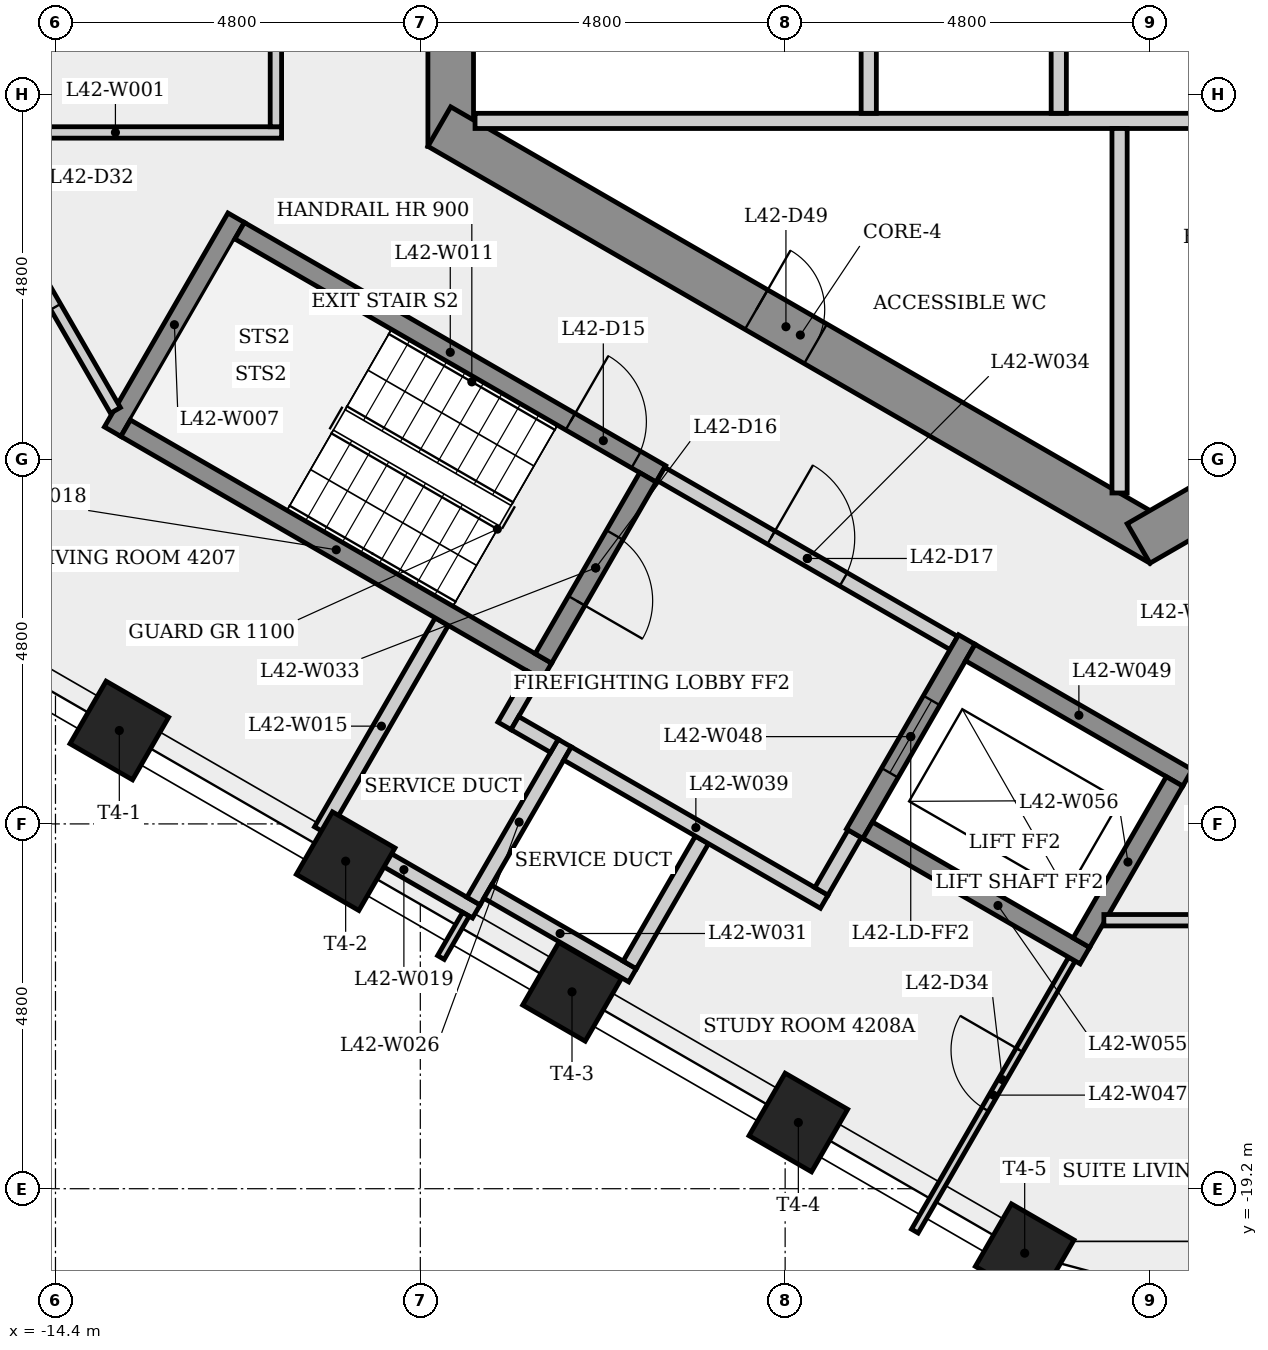
"""IFC4 building model, lengths in metres.
Left out: names, types, materials, properties, quantities, classifications, styles, units other than length and angle.
Written with IfcOpenShell. Run it as: python <this file> out.ifc"""

import sys

from ifc_helpers import new_model, si_unit, direction, frame, frame_2d, origin, origin_2d, place, context, subcontext, project, spatial, rectangle, extrude, element, fill, save


model = new_model("IFC4")
c1 = context("Model", 3, precision=1e-05, world=origin(), true_north=direction((0.0, 1.0)))
c2 = subcontext(c1, "Body", "Model", "MODEL_VIEW")
j1 = project(units=[si_unit("LENGTHUNIT", "METRE"), si_unit("PLANEANGLEUNIT", "RADIAN")], contexts=[c1])
p1 = place(None, origin())
s1 = spatial("IfcSite", under=j1, at=p1, CompositionType="ELEMENT")
p2 = place(p1, origin())
s2 = spatial("IfcBuilding", under=s1, at=p2, CompositionType="ELEMENT")
p3 = place(p2, frame((0.0, 0.0, 159.5)))
s3 = spatial("IfcBuildingStorey", under=s2, at=p3, CompositionType="ELEMENT", Elevation=159.5)
p4 = place(p3, frame((-9.2, 5.485, 0.0), z_axis=(0.0, 0.0, 1.0), x_axis=(0.0, -1.0, 0.0)))
e1 = element("IfcWall", 1, at=p4, inside=s3, PredefinedType="SHEAR", context=c2, shape_type="SweptSolid", body=[
    extrude(rectangle(XDim=10.97, YDim=0.6, at=frame_2d((5.485, 0.0))), origin(), (0.0, 0.0, 1.0), 3.4),
])
p5 = place(p4, frame((8.516, 0.0, 0.0)))
e2 = element("IfcOpeningElement", 2, at=p5, cuts=e1, PredefinedType="OPENING", context=c2, shape_type="SweptSolid", body=[
    extrude(rectangle(XDim=0.9, YDim=2.1, at=frame_2d((0.45, 1.05))), frame((0.0, 0.31, 0.0), z_axis=(0.0, -1.0, 0.0), x_axis=(1.0, 0.0, 0.0)), (0.0, 0.0, 1.0), 0.62),
])
p6 = place(p4, frame((4.685, 0.0, 0.0)))
e3 = element("IfcOpeningElement", 3, at=p6, cuts=e1, PredefinedType="OPENING", context=c2, shape_type="SweptSolid", body=[
    extrude(rectangle(XDim=1.6, YDim=2.1, at=frame_2d((0.8, 1.05))), frame((0.0, 0.31, 0.0), z_axis=(0.0, -1.0, 0.0), x_axis=(1.0, 0.0, 0.0)), (0.0, 0.0, 1.0), 0.62),
])
p7 = place(p3, frame((-9.35, -5.225, 0.0), z_axis=(0.0, 0.0, 1.0), x_axis=(0.866023993627, -0.500002442456, 0.0)))
e4 = element("IfcWall", 4, at=p7, inside=s3, PredefinedType="SHEAR", context=c2, shape_type="SweptSolid", body=[
    extrude(rectangle(XDim=10.97, YDim=0.6, at=frame_2d((5.485, 0.0))), origin(), (0.0, 0.0, 1.0), 3.4),
])
p8 = place(p7, frame((4.816, 0.0, 0.0)))
e5 = element("IfcOpeningElement", 5, at=p8, cuts=e4, PredefinedType="OPENING", context=c2, shape_type="SweptSolid", body=[
    extrude(rectangle(XDim=0.9, YDim=2.1, at=frame_2d((0.45, 1.05))), frame((0.0, 0.31, 0.0), z_axis=(0.0, -1.0, 0.0), x_axis=(1.0, 0.0, 0.0)), (0.0, 0.0, 1.0), 0.62),
])
p9 = place(p3, frame((-0.15, -10.71, 0.0), z_axis=(0.0, 0.0, 1.0), x_axis=(0.866023993627, 0.500002442456, 0.0)))
e6 = element("IfcWall", 6, at=p9, inside=s3, PredefinedType="SHEAR", context=c2, shape_type="SweptSolid", body=[
    extrude(rectangle(XDim=10.97, YDim=0.6, at=frame_2d((5.485, 0.0))), origin(), (0.0, 0.0, 1.0), 3.4),
])
p10 = place(p9, frame((1.975, 0.0, 0.0)))
e7 = element("IfcOpeningElement", 7, at=p10, cuts=e6, PredefinedType="OPENING", context=c2, shape_type="SweptSolid", body=[
    extrude(rectangle(XDim=0.9, YDim=2.1, at=frame_2d((0.45, 1.05))), frame((0.0, 0.31, 0.0), z_axis=(0.0, -1.0, 0.0), x_axis=(1.0, 0.0, 0.0)), (0.0, 0.0, 1.0), 0.62),
])
p11 = place(p9, frame((8.782, 0.0, 0.0)))
e8 = element("IfcOpeningElement", 8, at=p11, cuts=e6, PredefinedType="OPENING", context=c2, shape_type="SweptSolid", body=[
    extrude(rectangle(XDim=0.9, YDim=2.1, at=frame_2d((0.45, 1.05))), frame((0.0, 0.31, 0.0), z_axis=(0.0, -1.0, 0.0), x_axis=(1.0, 0.0, 0.0)), (0.0, 0.0, 1.0), 0.62),
])
for number, where, z_axis, x_axis in (
    (9, (-13.56, -13.171, 0.0), (0.0, 0.0, 1.0), (-0.5, -0.866, 0.0)),
    (10, (-10.582, -14.89, 0.0), (0.0, 0.0, 1.0), (-0.5, -0.866, 0.0)),
    (11, (-7.604, -16.61, 0.0), (0.0, 0.0, 1.0), (-0.5, -0.866, 0.0)),
    (12, (-4.626, -18.329, 0.0), (0.0, 0.0, 1.0), (-0.5, -0.866, 0.0)),
    (13, (-1.648, -20.048, 0.0), (0.0, 0.0, 1.0), (-0.5, -0.866, 0.0)),
):
    element("IfcColumn", number, at=place(p3, frame(where, z_axis=z_axis, x_axis=x_axis)), inside=s3, PredefinedType="COLUMN", context=c2, shape_type="SweptSolid", body=[
        extrude(rectangle(XDim=0.95, YDim=0.95, at=origin_2d()), origin(), (0.0, 0.0, 1.0), 3.4),
    ])
p12 = place(p3, frame((-15.798, -5.302, 0.0), z_axis=(0.0, 0.0, 1.0), x_axis=(1.0, 0.0, 0.0)))
e14 = element("IfcWall", 14, at=p12, inside=s3, PredefinedType="PARTITIONING", context=c2, shape_type="SweptSolid", body=[
    extrude(rectangle(XDim=4.373, YDim=0.15, at=frame_2d((2.187, 0.0))), origin(), (0.0, 0.0, 1.0), 3.05),
])
p13 = place(p3, frame((-13.648, -9.239, 0.0), z_axis=(0.0, 0.0, 1.0), x_axis=(0.500017246033, 0.866015446554, 0.0)))
e15 = element("IfcWall", 15, at=p13, inside=s3, PredefinedType="SHEAR", context=c2, shape_type="SweptSolid", body=[
    extrude(rectangle(XDim=3.25, YDim=0.25, at=frame_2d((1.625, 0.0))), origin(), (0.0, 0.0, 1.0), 3.05),
])
p14 = place(p3, frame((-13.611, -8.959, 0.0), z_axis=(0.0, 0.0, 1.0), x_axis=(-0.499994179242, 0.866028764375, 0.0)))
e16 = element("IfcWall", 16, at=p14, inside=s3, PredefinedType="PARTITIONING", context=c2, shape_type="SweptSolid", body=[
    extrude(rectangle(XDim=4.148, YDim=0.15, at=frame_2d((2.074, 0.0))), origin(), (0.0, 0.0, 1.0), 3.05),
])
p15 = place(p14, frame((1.574, 0.0, 0.0)))
e17 = element("IfcOpeningElement", 17, at=p15, cuts=e16, PredefinedType="OPENING", context=c2, shape_type="SweptSolid", body=[
    extrude(rectangle(XDim=1.0, YDim=2.1, at=frame_2d((0.5, 1.05))), frame((0.0, 0.085, 0.0), z_axis=(0.0, -1.0, 0.0), x_axis=(1.0, 0.0, 0.0)), (0.0, 0.0, 1.0), 0.17),
])
p16 = place(p3, frame((-11.977, -6.595, 0.0), z_axis=(0.0, 0.0, 1.0), x_axis=(0.866025499775, -0.499999833739, 0.0)))
e18 = element("IfcWall", 18, at=p16, inside=s3, PredefinedType="SHEAR", context=c2, shape_type="SweptSolid", body=[
    extrude(rectangle(XDim=6.4, YDim=0.25, at=frame_2d((3.2, 0.0))), origin(), (0.0, 0.0, 1.0), 3.05),
])
p17 = place(p16, frame((5.025, 0.0, 0.0)))
e19 = element("IfcOpeningElement", 19, at=p17, cuts=e18, PredefinedType="OPENING", context=c2, shape_type="SweptSolid", body=[
    extrude(rectangle(XDim=1.0, YDim=2.1, at=frame_2d((0.5, 1.05))), frame((0.0, 0.135, 0.0), z_axis=(0.0, -1.0, 0.0), x_axis=(1.0, 0.0, 0.0)), (0.0, 0.0, 1.0), 0.27),
])
p18 = place(p3, frame((-11.5, -5.227, 0.0), z_axis=(0.0, 0.0, 1.0), x_axis=(0.0, 1.0, 0.0)))
e20 = element("IfcWall", 20, at=p18, inside=s3, PredefinedType="PARTITIONING", context=c2, shape_type="SweptSolid", body=[
    extrude(rectangle(XDim=10.604, YDim=0.15, at=frame_2d((5.302, 0.0))), origin(), (0.0, 0.0, 1.0), 3.05),
])
p19 = place(p18, frame((9.229, 0.0, 0.0)))
e21 = element("IfcOpeningElement", 21, at=p19, cuts=e20, PredefinedType="OPENING", context=c2, shape_type="SweptSolid", body=[
    extrude(rectangle(XDim=0.9, YDim=2.1, at=frame_2d((0.45, 1.05))), frame((0.0, 0.085, 0.0), z_axis=(0.0, -1.0, 0.0), x_axis=(1.0, 0.0, 0.0)), (0.0, 0.0, 1.0), 0.17),
])
p20 = place(p18, frame((2.982, 0.0, 0.0)))
e22 = element("IfcOpeningElement", 22, at=p20, cuts=e20, PredefinedType="OPENING", context=c2, shape_type="SweptSolid", body=[
    extrude(rectangle(XDim=1.0, YDim=2.1, at=frame_2d((0.5, 1.05))), frame((0.0, 0.085, 0.0), z_axis=(0.0, -1.0, 0.0), x_axis=(1.0, 0.0, 0.0)), (0.0, 0.0, 1.0), 0.17),
])
p21 = place(p3, frame((-10.905, -14.489, 0.0), z_axis=(0.0, 0.0, 1.0), x_axis=(0.499959856469, 0.866048579423, 0.0)))
e23 = element("IfcWall", 23, at=p21, inside=s3, PredefinedType="PLUMBINGWALL", context=c2, shape_type="SweptSolid", body=[
    extrude(rectangle(XDim=3.175, YDim=0.2, at=frame_2d((1.587, 0.0))), origin(), (0.0, 0.0, 1.0), 3.05),
])
p22 = place(p3, frame((-13.477, -9.193, 0.0), z_axis=(0.0, 0.0, 1.0), x_axis=(0.866025499775, -0.499999833739, 0.0)))
e24 = element("IfcWall", 24, at=p22, inside=s3, PredefinedType="SHEAR", context=c2, shape_type="SweptSolid", body=[
    extrude(rectangle(XDim=6.4, YDim=0.25, at=frame_2d((3.2, 0.0))), origin(), (0.0, 0.0, 1.0), 3.05),
])
p23 = place(p3, frame((-8.863, -15.552, 0.0), z_axis=(0.0, 0.0, 1.0), x_axis=(-0.866035918664, 0.499981787252, 0.0)))
e25 = element("IfcWall", 25, at=p23, inside=s3, PredefinedType="PLUMBINGWALL", context=c2, shape_type="SweptSolid", body=[
    extrude(rectangle(XDim=2.2, YDim=0.2, at=frame_2d((1.1, 0.0))), origin(), (0.0, 0.0, 1.0), 3.05),
])
p24 = place(p3, frame((-9.0, -15.588, 0.0), z_axis=(0.0, 0.0, 1.0), x_axis=(-0.500011643316, -0.866018681408, 0.0)))
e26 = element("IfcWall", 26, at=p24, inside=s3, PredefinedType="PARTITIONING", context=c2, shape_type="SweptSolid", body=[
    extrude(rectangle(XDim=0.658, YDim=0.1, at=frame_2d((0.329, 0.0))), origin(), (0.0, 0.0, 1.0), 3.05),
])
p25 = place(p3, frame((-8.88, -5.15, 0.0), z_axis=(0.0, 0.0, 1.0), x_axis=(1.0, 0.0, 0.0)))
e27 = element("IfcWall", 27, at=p25, inside=s3, PredefinedType="PARTITIONING", context=c2, shape_type="SweptSolid", body=[
    extrude(rectangle(XDim=11.205, YDim=0.2, at=frame_2d((5.603, 0.0))), origin(), (0.0, 0.0, 1.0), 3.05),
])
p26 = place(p3, frame((-8.493, -13.11, 0.0), z_axis=(0.0, 0.0, 1.0), x_axis=(0.500067724834, 0.865986299303, 0.0)))
e28 = element("IfcWall", 28, at=p26, inside=s3, PredefinedType="PLUMBINGWALL", context=c2, shape_type="SweptSolid", body=[
    extrude(rectangle(XDim=0.775, YDim=0.2, at=frame_2d((0.388, 0.0))), origin(), (0.0, 0.0, 1.0), 3.05),
])
p27 = place(p3, frame((-7.7, -13.337, 0.0), z_axis=(0.0, 0.0, 1.0), x_axis=(-0.500001309137, -0.866024647952, 0.0)))
e29 = element("IfcWall", 29, at=p27, inside=s3, PredefinedType="PLUMBINGWALL", context=c2, shape_type="SweptSolid", body=[
    extrude(rectangle(XDim=2.4, YDim=0.2, at=frame_2d((1.2, 0.0))), origin(), (0.0, 0.0, 1.0), 3.05),
])
p28 = place(p3, frame((-7.836, -13.373, 0.0), z_axis=(0.0, 0.0, 1.0), x_axis=(-0.866232998003, 0.499640263761, 0.0)))
e30 = element("IfcWall", 30, at=p28, inside=s3, PredefinedType="PLUMBINGWALL", context=c2, shape_type="SweptSolid", body=[
    extrude(rectangle(XDim=0.6, YDim=0.2, at=frame_2d((0.3, 0.0))), origin(), (0.0, 0.0, 1.0), 3.05),
])
p29 = place(p3, frame((-6.808, -16.392, 0.0), z_axis=(0.0, 0.0, 1.0), x_axis=(-0.866008176907, 0.50002983664, 0.0)))
e31 = element("IfcWall", 31, at=p29, inside=s3, PredefinedType="PLUMBINGWALL", context=c2, shape_type="SweptSolid", body=[
    extrude(rectangle(XDim=2.2, YDim=0.2, at=frame_2d((1.1, 0.0))), origin(), (0.0, 0.0, 1.0), 3.05),
])
p30 = place(p3, frame((-6.605, -9.841, 0.0), z_axis=(0.0, 0.0, 1.0), x_axis=(-0.499996545922, -0.866027397988, 0.0)))
e32 = element("IfcWall", 32, at=p30, inside=s3, PredefinedType="SHEAR", context=c2, shape_type="SweptSolid", body=[
    extrude(rectangle(XDim=2.75, YDim=0.25, at=frame_2d((1.375, 0.0))), origin(), (0.0, 0.0, 1.0), 3.05),
])
p31 = place(p30, frame((0.875, 0.0, 0.0)))
e33 = element("IfcOpeningElement", 33, at=p31, cuts=e32, PredefinedType="OPENING", context=c2, shape_type="SweptSolid", body=[
    extrude(rectangle(XDim=1.0, YDim=2.1, at=frame_2d((0.5, 1.05))), frame((0.0, 0.135, 0.0), z_axis=(0.0, -1.0, 0.0), x_axis=(1.0, 0.0, 0.0)), (0.0, 0.0, 1.0), 0.27),
])
p32 = place(p3, frame((-6.435, -9.795, 0.0), z_axis=(0.0, 0.0, 1.0), x_axis=(0.866012907634, -0.500021643343, 0.0)))
e34 = element("IfcWall", 34, at=p32, inside=s3, PredefinedType="PARTITIONING", context=c2, shape_type="SweptSolid", body=[
    extrude(rectangle(XDim=4.45, YDim=0.2, at=frame_2d((2.225, 0.0))), origin(), (0.0, 0.0, 1.0), 3.05),
])
p33 = place(p32, frame((1.675, 0.0, 0.0)))
e35 = element("IfcOpeningElement", 35, at=p33, cuts=e34, PredefinedType="OPENING", context=c2, shape_type="SweptSolid", body=[
    extrude(rectangle(XDim=1.1, YDim=2.1, at=frame_2d((0.55, 1.05))), frame((0.0, 0.11, 0.0), z_axis=(0.0, -1.0, 0.0), x_axis=(1.0, 0.0, 0.0)), (0.0, 0.0, 1.0), 0.22),
])
p34 = place(p3, frame((-5.895, -14.61, 0.0), z_axis=(0.0, 0.0, 1.0), x_axis=(-0.500022797313, -0.86601224135, 0.0)))
e36 = element("IfcWall", 36, at=p34, inside=s3, PredefinedType="PLUMBINGWALL", context=c2, shape_type="SweptSolid", body=[
    extrude(rectangle(XDim=1.9, YDim=0.2, at=frame_2d((0.95, 0.0))), origin(), (0.0, 0.0, 1.0), 3.05),
])
p35 = place(p3, frame((-4.286, -15.423, 0.0), z_axis=(0.0, 0.0, 1.0), x_axis=(-0.866042777325, 0.499969906938, 0.0)))
e37 = element("IfcWall", 37, at=p35, inside=s3, PredefinedType="PARTITIONING", context=c2, shape_type="SweptSolid", body=[
    extrude(rectangle(XDim=3.9, YDim=0.2, at=frame_2d((1.95, 0.0))), origin(), (0.0, 0.0, 1.0), 3.05),
])
p36 = place(p3, frame((-3.885, -14.529, 0.0), z_axis=(0.0, 0.0, 1.0), x_axis=(-0.499859285417, -0.866106630146, 0.0)))
e38 = element("IfcWall", 38, at=p36, inside=s3, PredefinedType="PARTITIONING", context=c2, shape_type="SweptSolid", body=[
    extrude(rectangle(XDim=0.875, YDim=0.2, at=frame_2d((0.438, 0.0))), origin(), (0.0, 0.0, 1.0), 3.05),
])
p37 = place(p3, frame((-3.7, -1.9, 0.0), z_axis=(0.0, 0.0, 1.0), x_axis=(0.0, -1.0, 0.0)))
e39 = element("IfcWall", 39, at=p37, inside=s3, PredefinedType="PARTITIONING", context=c2, shape_type="SweptSolid", body=[
    extrude(rectangle(XDim=3.15, YDim=0.2, at=frame_2d((1.575, 0.0))), origin(), (0.0, 0.0, 1.0), 3.05),
])
p38 = place(p3, frame((-3.094, -19.758, 0.0), z_axis=(0.0, 0.0, 1.0), x_axis=(0.500027577057, 0.866009481578, 0.0)))
e40 = element("IfcWall", 40, at=p38, inside=s3, PredefinedType="PARTITIONING", context=c2, shape_type="SweptSolid", body=[
    extrude(rectangle(XDim=4.133, YDim=0.1, at=frame_2d((2.066, 0.0))), origin(), (0.0, 0.0, 1.0), 3.05),
])
p39 = place(p38, frame((1.852, 0.0, 0.0)))
e41 = element("IfcOpeningElement", 41, at=p39, cuts=e40, PredefinedType="OPENING", context=c2, shape_type="SweptSolid", body=[
    extrude(rectangle(XDim=0.9, YDim=2.1, at=frame_2d((0.45, 1.05))), frame((0.0, 0.06, 0.0), z_axis=(0.0, -1.0, 0.0), x_axis=(1.0, 0.0, 0.0)), (0.0, 0.0, 1.0), 0.12),
])
p40 = place(p3, frame((-2.41, -11.974, 0.0), z_axis=(0.0, 0.0, 1.0), x_axis=(-0.500001826776, -0.866024349092, 0.0)))
e42 = element("IfcWall", 42, at=p40, inside=s3, PredefinedType="SHEAR", context=c2, shape_type="SweptSolid", body=[
    extrude(rectangle(XDim=2.95, YDim=0.25, at=frame_2d((1.475, 0.0))), origin(), (0.0, 0.0, 1.0), 3.05),
])
p41 = place(p40, frame((0.925, 0.0, 0.0)))
e43 = element("IfcOpeningElement", 43, at=p41, cuts=e42, PredefinedType="OPENING", context=c2, shape_type="SweptSolid", body=[
    extrude(rectangle(XDim=1.1, YDim=2.1, at=frame_2d((0.55, 1.05))), frame((0.0, 0.135, 0.0), z_axis=(0.0, -1.0, 0.0), x_axis=(1.0, 0.0, 0.0)), (0.0, 0.0, 1.0), 0.27),
])
p42 = place(p3, frame((-2.364, -12.145, 0.0), z_axis=(0.0, 0.0, 1.0), x_axis=(0.866040211805, -0.499974350878, 0.0)))
e44 = element("IfcWall", 44, at=p42, inside=s3, PredefinedType="SHEAR", context=c2, shape_type="SweptSolid", body=[
    extrude(rectangle(XDim=3.3, YDim=0.25, at=frame_2d((1.65, 0.0))), origin(), (0.0, 0.0, 1.0), 3.05),
])
p43 = place(p3, frame((-1.2, -1.9, 0.0), z_axis=(0.0, 0.0, 1.0), x_axis=(0.0, -1.0, 0.0)))
e45 = element("IfcWall", 45, at=p43, inside=s3, PredefinedType="PARTITIONING", context=c2, shape_type="SweptSolid", body=[
    extrude(rectangle(XDim=3.15, YDim=0.2, at=frame_2d((1.575, 0.0))), origin(), (0.0, 0.0, 1.0), 3.05),
])
p44 = place(p3, frame((-0.856, -16.133, 0.0), z_axis=(0.0, 0.0, 1.0), x_axis=(-0.866021716278, 0.500006386895, 0.0)))
e46 = element("IfcWall", 46, at=p44, inside=s3, PredefinedType="SHEAR", context=c2, shape_type="SweptSolid", body=[
    extrude(rectangle(XDim=3.3, YDim=0.25, at=frame_2d((1.65, 0.0))), origin(), (0.0, 0.0, 1.0), 3.05),
])
p45 = place(p3, frame((-0.902, -15.962, 0.0), z_axis=(0.0, 0.0, 1.0), x_axis=(0.500061746146, 0.865989751695, 0.0)))
e47 = element("IfcWall", 47, at=p45, inside=s3, PredefinedType="SHEAR", context=c2, shape_type="SweptSolid", body=[
    extrude(rectangle(XDim=2.45, YDim=0.25, at=frame_2d((1.225, 0.0))), origin(), (0.0, 0.0, 1.0), 3.4),
])
p46 = place(p3, frame((-0.4, -5.25, 0.0), z_axis=(0.0, 0.0, 1.0), x_axis=(0.0, -1.0, 0.0)))
e48 = element("IfcWall", 48, at=p46, inside=s3, PredefinedType="PARTITIONING", context=c2, shape_type="SweptSolid", body=[
    extrude(rectangle(XDim=4.796, YDim=0.2, at=frame_2d((2.398, 0.0))), origin(), (0.0, 0.0, 1.0), 3.05),
])
p47 = place(p3, frame((3.428, -15.667, 0.0), z_axis=(0.0, 0.0, 1.0), x_axis=(-1.0, 0.0, 0.0)))
e49 = element("IfcWall", 49, at=p47, inside=s3, PredefinedType="PARTITIONING", context=c2, shape_type="SweptSolid", body=[
    extrude(rectangle(XDim=4.035, YDim=0.15, at=frame_2d((2.017, 0.0))), origin(), (0.0, 0.0, 1.0), 3.05),
])
p48 = place(p47, frame((1.517, 0.0, 0.0)))
e50 = element("IfcOpeningElement", 50, at=p48, cuts=e49, PredefinedType="OPENING", context=c2, shape_type="SweptSolid", body=[
    extrude(rectangle(XDim=1.0, YDim=2.1, at=frame_2d((0.5, 1.05))), frame((0.0, 0.085, 0.0), z_axis=(0.0, -1.0, 0.0), x_axis=(1.0, 0.0, 0.0)), (0.0, 0.0, 1.0), 0.17),
])
p49 = place(p17, origin())
e51 = element("IfcDoor", 51, at=p49, inside=s3, OperationType="SINGLE_SWING_LEFT", PredefinedType="DOOR", context=c2, shape_type="SweptSolid", body=[
    extrude(rectangle(XDim=1.0, YDim=2.1, at=frame_2d((0.5, 1.05))), frame((0.0, 0.025, 0.0), z_axis=(0.0, -1.0, 0.0), x_axis=(1.0, 0.0, 0.0)), (0.0, 0.0, 1.0), 0.05),
])
fill(e19, e51)
p50 = place(p31, origin())
e52 = element("IfcDoor", 52, at=p50, inside=s3, OperationType="SINGLE_SWING_RIGHT", PredefinedType="DOOR", context=c2, shape_type="SweptSolid", body=[
    extrude(rectangle(XDim=1.0, YDim=2.1, at=frame_2d((0.5, 1.05))), frame((0.0, 0.025, 0.0), z_axis=(0.0, -1.0, 0.0), x_axis=(1.0, 0.0, 0.0)), (0.0, 0.0, 1.0), 0.05),
])
fill(e33, e52)
p51 = place(p33, origin())
e53 = element("IfcDoor", 53, at=p51, inside=s3, OperationType="SINGLE_SWING_LEFT", PredefinedType="DOOR", context=c2, shape_type="SweptSolid", body=[
    extrude(rectangle(XDim=1.1, YDim=2.1, at=frame_2d((0.55, 1.05))), frame((0.0, 0.025, 0.0), z_axis=(0.0, -1.0, 0.0), x_axis=(1.0, 0.0, 0.0)), (0.0, 0.0, 1.0), 0.05),
])
fill(e35, e53)
p52 = place(p41, origin())
e54 = element("IfcDoor", 54, at=p52, inside=s3, OperationType="SLIDING_TO_LEFT", PredefinedType="DOOR", context=c2, shape_type="SweptSolid", body=[
    extrude(rectangle(XDim=1.1, YDim=2.1, at=frame_2d((0.55, 1.05))), frame((0.0, 0.025, 0.0), z_axis=(0.0, -1.0, 0.0), x_axis=(1.0, 0.0, 0.0)), (0.0, 0.0, 1.0), 0.05),
])
fill(e43, e54)
p53 = place(p15, origin())
e55 = element("IfcDoor", 55, at=p53, inside=s3, OperationType="SINGLE_SWING_RIGHT", PredefinedType="DOOR", context=c2, shape_type="SweptSolid", body=[
    extrude(rectangle(XDim=1.0, YDim=2.1, at=frame_2d((0.5, 1.05))), frame((0.0, 0.025, 0.0), z_axis=(0.0, -1.0, 0.0), x_axis=(1.0, 0.0, 0.0)), (0.0, 0.0, 1.0), 0.05),
])
fill(e17, e55)
p54 = place(p39, origin())
e56 = element("IfcDoor", 56, at=p54, inside=s3, OperationType="SINGLE_SWING_RIGHT", PredefinedType="DOOR", context=c2, shape_type="SweptSolid", body=[
    extrude(rectangle(XDim=0.9, YDim=2.1, at=frame_2d((0.45, 1.05))), frame((0.0, 0.025, 0.0), z_axis=(0.0, -1.0, 0.0), x_axis=(1.0, 0.0, 0.0)), (0.0, 0.0, 1.0), 0.05),
])
fill(e41, e56)
p55 = place(p8, origin())
e57 = element("IfcDoor", 57, at=p55, inside=s3, OperationType="SINGLE_SWING_LEFT", PredefinedType="DOOR", context=c2, shape_type="SweptSolid", body=[
    extrude(rectangle(XDim=0.9, YDim=2.1, at=frame_2d((0.45, 1.05))), frame((0.0, 0.025, 0.0), z_axis=(0.0, -1.0, 0.0), x_axis=(1.0, 0.0, 0.0)), (0.0, 0.0, 1.0), 0.05),
])
fill(e5, e57)
save(model, sys.argv[1])
